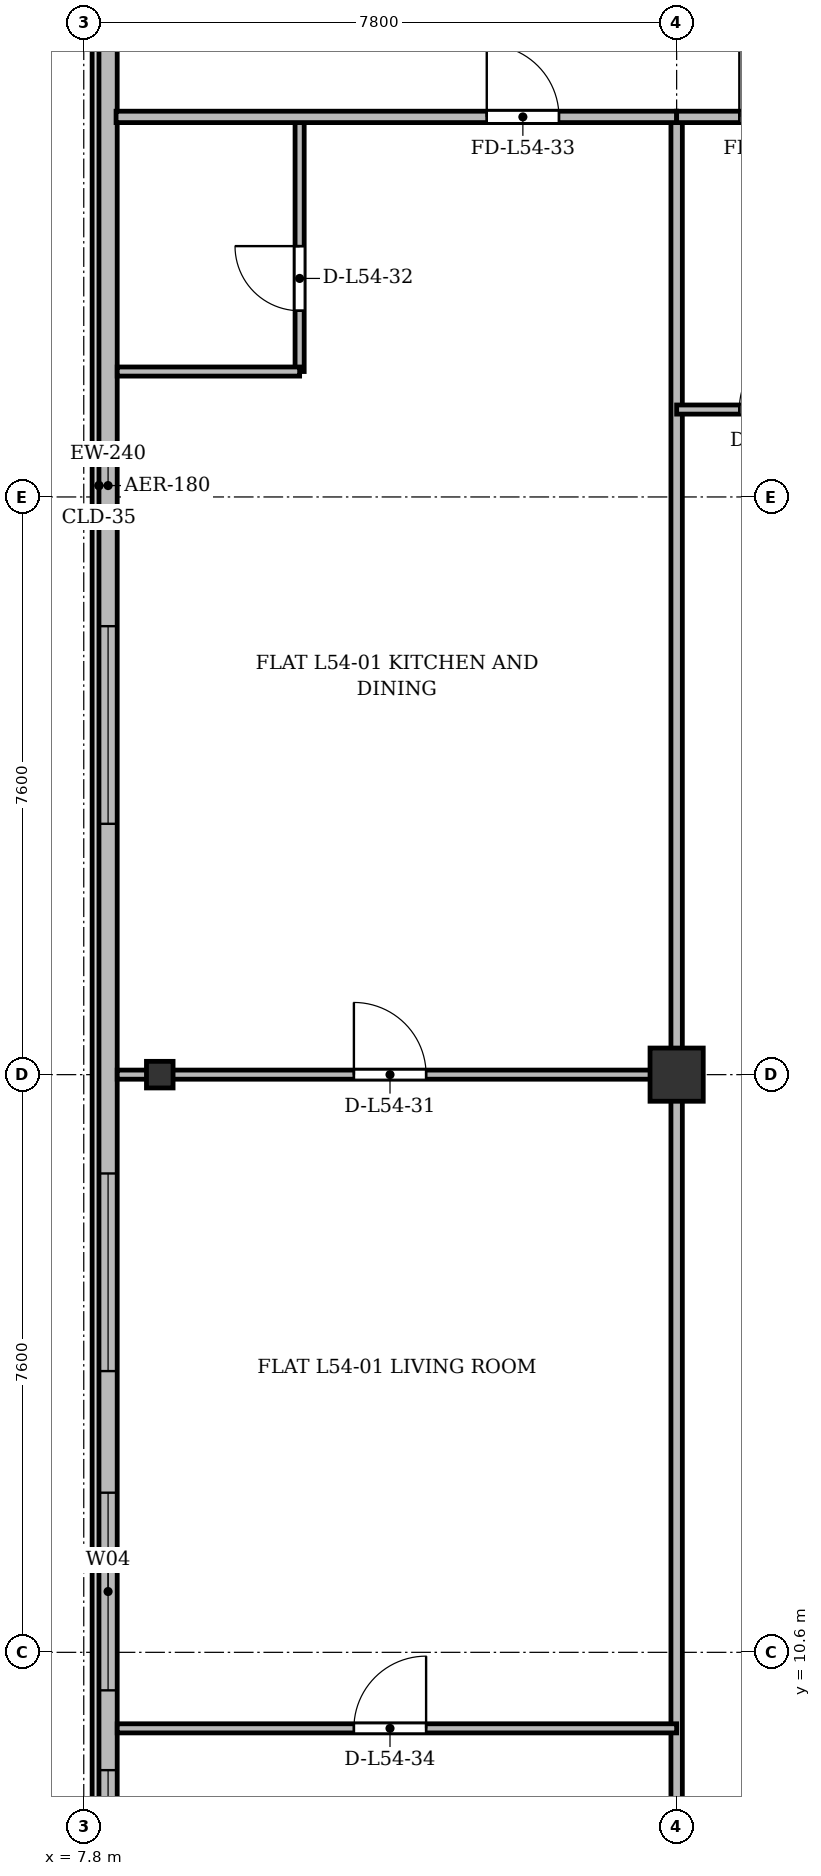
"""IFC4 building model, lengths in metres.
Left out: names, types, materials, properties, quantities, classifications, styles, units other than length and angle.
Written with IfcOpenShell. Run it as: python <this file> out.ifc"""

import sys

from ifc_helpers import new_model, si_unit, direction, frame, frame_2d, origin, origin_2d, place, context, subcontext, project, spatial, rectangle, i_section, extrude, source, transform, mapped, element, fill, save


model = new_model("IFC4")
c1 = context("Model", 3, precision=1e-05, world=origin(), true_north=direction((0.0, 1.0)))
c2 = subcontext(c1, "Body", "Model", "MODEL_VIEW")
j1 = project(units=[si_unit("LENGTHUNIT", "METRE"), si_unit("PLANEANGLEUNIT", "RADIAN")], contexts=[c1])
p1 = place(None, origin())
s1 = spatial("IfcSite", under=j1, at=p1, CompositionType="ELEMENT")
p2 = place(p1, origin())
s2 = spatial("IfcBuilding", under=s1, at=p2, CompositionType="ELEMENT")
p3 = place(p2, frame((0.0, 0.0, 208.5)))
s3 = spatial("IfcBuildingStorey", under=s2, at=p3, CompositionType="ELEMENT", Elevation=208.5)
m1 = source(origin(), c2, "Body", "SweptSolid", [
    extrude(i_section(OverallWidth=0.35, OverallDepth=0.35, WebThickness=0.018, FlangeThickness=0.028, at=origin_2d()), origin(), (0.0, 0.0, 1.0), 3.6),
])
p4 = place(p3, frame((8.8, 18.2, 0.0), z_axis=(0.0, 0.0, 1.0), x_axis=(1.0, 0.0, 0.0)))
e1 = element("IfcColumn", 1, at=p4, inside=s3, PredefinedType="COLUMN", context=c2, shape_type="MappedRepresentation", body=[
    mapped(m1, transform((0.0, 0.0, 0.0), x_axis=(1.0, 0.0, 0.0), y_axis=(0.0, 1.0, 0.0), z_axis=(0.0, 0.0, 1.0), scale=1.0)),
])
m2 = source(origin(), c2, "Body", "SweptSolid", [
    extrude(rectangle(XDim=0.7, YDim=0.7, at=origin_2d()), origin(), (0.0, 0.0, 1.0), 3.6),
])
p5 = place(p3, frame((15.6, 18.2, 0.0), z_axis=(0.0, 0.0, 1.0), x_axis=(1.0, 0.0, 0.0)))
e2 = element("IfcColumn", 2, at=p5, inside=s3, PredefinedType="COLUMN", context=c2, shape_type="MappedRepresentation", body=[
    mapped(m2, transform((0.0, 0.0, 0.0), x_axis=(1.0, 0.0, 0.0), y_axis=(0.0, 1.0, 0.0), z_axis=(0.0, 0.0, 1.0), scale=1.0)),
])
p6 = place(p3, frame((8.12, 6.4, 0.0), z_axis=(0.0, 0.0, 1.0), x_axis=(0.0, 1.0, 0.0)))
e3 = element("IfcWall", 3, at=p6, inside=s3, PredefinedType="SOLIDWALL", context=c2, shape_type="SweptSolid", body=[
    extrude(rectangle(XDim=39.1, YDim=0.24, at=frame_2d((19.55, 0.0))), origin(), (0.0, 0.0, 1.0), 3.36),
])
p7 = place(p6, frame((1.45, 0.0, 0.92)))
e4 = element("IfcOpeningElement", 4, at=p7, cuts=e3, PredefinedType="OPENING", context=c2, shape_type="SweptSolid", body=[
    extrude(rectangle(XDim=1.2, YDim=1.65, at=frame_2d((0.6, 0.825))), frame((0.0, 0.13, 0.0), z_axis=(0.0, -1.0, 0.0), x_axis=(1.0, 0.0, 0.0)), (0.0, 0.0, 1.0), 0.26),
])
p8 = place(p6, frame((3.7, 0.0, 0.92)))
e5 = element("IfcOpeningElement", 5, at=p8, cuts=e3, PredefinedType="OPENING", context=c2, shape_type="SweptSolid", body=[
    extrude(rectangle(XDim=2.6, YDim=1.9, at=frame_2d((1.3, 0.95))), frame((0.0, 0.13, 0.0), z_axis=(0.0, -1.0, 0.0), x_axis=(1.0, 0.0, 0.0)), (0.0, 0.0, 1.0), 0.26),
])
p9 = place(p6, frame((7.9, 0.0, 0.92)))
e6 = element("IfcOpeningElement", 6, at=p9, cuts=e3, PredefinedType="OPENING", context=c2, shape_type="SweptSolid", body=[
    extrude(rectangle(XDim=2.6, YDim=1.9, at=frame_2d((1.3, 0.95))), frame((0.0, 0.13, 0.0), z_axis=(0.0, -1.0, 0.0), x_axis=(1.0, 0.0, 0.0)), (0.0, 0.0, 1.0), 0.26),
])
p10 = place(p6, frame((15.1, 0.0, 0.92)))
e7 = element("IfcOpeningElement", 7, at=p10, cuts=e3, PredefinedType="OPENING", context=c2, shape_type="SweptSolid", body=[
    extrude(rectangle(XDim=2.6, YDim=1.9, at=frame_2d((1.3, 0.95))), frame((0.0, 0.13, 0.0), z_axis=(0.0, -1.0, 0.0), x_axis=(1.0, 0.0, 0.0)), (0.0, 0.0, 1.0), 0.26),
])
p11 = place(p6, frame((33.4, 0.0, 0.92)))
e8 = element("IfcOpeningElement", 8, at=p11, cuts=e3, PredefinedType="OPENING", context=c2, shape_type="SweptSolid", body=[
    extrude(rectangle(XDim=1.2, YDim=1.65, at=frame_2d((0.6, 0.825))), frame((0.0, 0.13, 0.0), z_axis=(0.0, -1.0, 0.0), x_axis=(1.0, 0.0, 0.0)), (0.0, 0.0, 1.0), 0.26),
])
p12 = place(p6, frame((36.75, 0.0, 0.92)))
e9 = element("IfcOpeningElement", 9, at=p12, cuts=e3, PredefinedType="OPENING", context=c2, shape_type="SweptSolid", body=[
    extrude(rectangle(XDim=1.2, YDim=1.65, at=frame_2d((0.6, 0.825))), frame((0.0, 0.13, 0.0), z_axis=(0.0, -1.0, 0.0), x_axis=(1.0, 0.0, 0.0)), (0.0, 0.0, 1.0), 0.26),
])
p13 = place(p3, frame((15.6, 3.625, 0.0), z_axis=(0.0, 0.0, 1.0), x_axis=(0.0, 1.0, 0.0)))
e10 = element("IfcWall", 10, at=p13, inside=s3, PredefinedType="PARTITIONING", context=c2, shape_type="SweptSolid", body=[
    extrude(rectangle(XDim=27.175, YDim=0.15, at=frame_2d((13.587, 0.0))), origin(), (0.0, 0.0, 1.0), 2.86),
])
p14 = place(p3, frame((8.24, 18.2, 0.0), z_axis=(0.0, 0.0, 1.0), x_axis=(1.0, 0.0, 0.0)))
e11 = element("IfcWall", 11, at=p14, inside=s3, PredefinedType="PARTITIONING", context=c2, shape_type="SweptSolid", body=[
    extrude(rectangle(XDim=7.36, YDim=0.12, at=frame_2d((3.68, 0.0))), origin(), (0.0, 0.0, 1.0), 2.91),
])
p15 = place(p14, frame((3.114, 0.0, 0.0)))
e12 = element("IfcOpeningElement", 12, at=p15, cuts=e11, PredefinedType="OPENING", context=c2, shape_type="SweptSolid", body=[
    extrude(rectangle(XDim=0.95, YDim=2.15, at=frame_2d((0.475, 1.075))), frame((0.0, 0.07, 0.0), z_axis=(0.0, -1.0, 0.0), x_axis=(1.0, 0.0, 0.0)), (0.0, 0.0, 1.0), 0.14),
])
p16 = place(p3, frame((10.64, 27.45, 0.0), z_axis=(0.0, 0.0, 1.0), x_axis=(0.0, 1.0, 0.0)))
e13 = element("IfcWall", 13, at=p16, inside=s3, PredefinedType="PARTITIONING", context=c2, shape_type="SweptSolid", body=[
    extrude(rectangle(XDim=3.35, YDim=0.12, at=frame_2d((1.675, 0.0))), origin(), (0.0, 0.0, 1.0), 3.36),
])
p17 = place(p16, frame((0.8, 0.0, 0.0)))
e14 = element("IfcOpeningElement", 14, at=p17, cuts=e13, PredefinedType="OPENING", context=c2, shape_type="SweptSolid", body=[
    extrude(rectangle(XDim=0.85, YDim=2.1, at=frame_2d((0.425, 1.05))), frame((0.0, 0.07, 0.0), z_axis=(0.0, -1.0, 0.0), x_axis=(1.0, 0.0, 0.0)), (0.0, 0.0, 1.0), 0.14),
])
p18 = place(p3, frame((8.24, 27.45, 0.0), z_axis=(0.0, 0.0, 1.0), x_axis=(1.0, 0.0, 0.0)))
e15 = element("IfcWall", 15, at=p18, inside=s3, PredefinedType="PARTITIONING", context=c2, shape_type="SweptSolid", body=[
    extrude(rectangle(XDim=2.4, YDim=0.12, at=frame_2d((1.2, 0.0))), origin(), (0.0, 0.0, 1.0), 2.86),
])
p19 = place(p3, frame((8.225, 30.8, 0.0), z_axis=(0.0, 0.0, 1.0), x_axis=(1.0, 0.0, 0.0)))
e16 = element("IfcWall", 16, at=p19, inside=s3, PredefinedType="PARTITIONING", context=c2, shape_type="SweptSolid", body=[
    extrude(rectangle(XDim=7.375, YDim=0.15, at=frame_2d((3.688, 0.0))), origin(), (0.0, 0.0, 1.0), 2.86),
])
p20 = place(p19, frame((4.877, 0.0, 0.0)))
e17 = element("IfcOpeningElement", 17, at=p20, cuts=e16, PredefinedType="OPENING", context=c2, shape_type="SweptSolid", body=[
    extrude(rectangle(XDim=0.95, YDim=2.15, at=frame_2d((0.475, 1.075))), frame((0.0, 0.085, 0.0), z_axis=(0.0, -1.0, 0.0), x_axis=(1.0, 0.0, 0.0)), (0.0, 0.0, 1.0), 0.17),
])
p21 = place(p3, frame((8.24, 9.6, 0.0), z_axis=(0.0, 0.0, 1.0), x_axis=(1.0, 0.0, 0.0)))
e18 = element("IfcWall", 18, at=p21, inside=s3, PredefinedType="PARTITIONING", context=c2, shape_type="SweptSolid", body=[
    extrude(rectangle(XDim=7.36, YDim=0.12, at=frame_2d((3.68, 0.0))), origin(), (0.0, 0.0, 1.0), 2.86),
])
p22 = place(p21, frame((3.114, 0.0, 0.0)))
e19 = element("IfcOpeningElement", 19, at=p22, cuts=e18, PredefinedType="OPENING", context=c2, shape_type="SweptSolid", body=[
    extrude(rectangle(XDim=0.95, YDim=2.15, at=frame_2d((0.475, 1.075))), frame((0.0, 0.07, 0.0), z_axis=(0.0, -1.0, 0.0), x_axis=(1.0, 0.0, 0.0)), (0.0, 0.0, 1.0), 0.14),
])
p23 = place(p3, frame((15.6, 30.8, 0.0), z_axis=(0.0, 0.0, 1.0), x_axis=(1.0, 0.0, 0.0)))
e20 = element("IfcWall", 20, at=p23, inside=s3, PredefinedType="PARTITIONING", context=c2, shape_type="SweptSolid", body=[
    extrude(rectangle(XDim=2.6, YDim=0.15, at=frame_2d((1.3, 0.0))), origin(), (0.0, 0.0, 1.0), 2.86),
])
p24 = place(p23, frame((0.825, 0.0, 0.0)))
e21 = element("IfcOpeningElement", 21, at=p24, cuts=e20, PredefinedType="OPENING", context=c2, shape_type="SweptSolid", body=[
    extrude(rectangle(XDim=0.95, YDim=2.15, at=frame_2d((0.475, 1.075))), frame((0.0, 0.085, 0.0), z_axis=(0.0, -1.0, 0.0), x_axis=(1.0, 0.0, 0.0)), (0.0, 0.0, 1.0), 0.17),
])
p25 = place(p3, frame((15.6, 26.95, 0.0), z_axis=(0.0, 0.0, 1.0), x_axis=(1.0, 0.0, 0.0)))
e22 = element("IfcWall", 22, at=p25, inside=s3, PredefinedType="PARTITIONING", context=c2, shape_type="SweptSolid", body=[
    extrude(rectangle(XDim=2.6, YDim=0.12, at=frame_2d((1.3, 0.0))), origin(), (0.0, 0.0, 1.0), 2.86),
])
p26 = place(p25, frame((0.825, 0.0, 0.0)))
e23 = element("IfcOpeningElement", 23, at=p26, cuts=e22, PredefinedType="OPENING", context=c2, shape_type="SweptSolid", body=[
    extrude(rectangle(XDim=0.95, YDim=2.15, at=frame_2d((0.475, 1.075))), frame((0.0, 0.07, 0.0), z_axis=(0.0, -1.0, 0.0), x_axis=(1.0, 0.0, 0.0)), (0.0, 0.0, 1.0), 0.14),
])
m3 = source(origin(), c2, "Body", "SweptSolid", [
    extrude(rectangle(XDim=1.2, YDim=1.65, at=frame_2d((0.6, 0.825))), frame((0.0, 0.03, 0.0), z_axis=(0.0, -1.0, 0.0), x_axis=(1.0, 0.0, 0.0)), (0.0, 0.0, 1.0), 0.06),
])
p27 = place(p7, origin())
e24 = element("IfcWindow", 24, at=p27, inside=s3, PartitioningType="SINGLE_PANEL", PredefinedType="WINDOW", context=c2, shape_type="MappedRepresentation", body=[
    mapped(m3, transform((0.0, 0.0, 0.0), x_axis=(1.0, 0.0, 0.0), y_axis=(0.0, 1.0, 0.0), z_axis=(0.0, 0.0, 1.0), scale=1.0)),
])
fill(e4, e24)
m4 = source(origin(), c2, "Body", "SweptSolid", [
    extrude(rectangle(XDim=2.6, YDim=1.9, at=frame_2d((1.3, 0.95))), frame((0.0, 0.03, 0.0), z_axis=(0.0, -1.0, 0.0), x_axis=(1.0, 0.0, 0.0)), (0.0, 0.0, 1.0), 0.06),
])
p28 = place(p8, origin())
e25 = element("IfcWindow", 25, at=p28, inside=s3, PartitioningType="SINGLE_PANEL", PredefinedType="WINDOW", context=c2, shape_type="MappedRepresentation", body=[
    mapped(m4, transform((0.0, 0.0, 0.0), x_axis=(1.0, 0.0, 0.0), y_axis=(0.0, 1.0, 0.0), z_axis=(0.0, 0.0, 1.0), scale=1.0)),
])
fill(e5, e25)
p29 = place(p9, origin())
e26 = element("IfcWindow", 26, at=p29, inside=s3, PartitioningType="SINGLE_PANEL", PredefinedType="WINDOW", context=c2, shape_type="MappedRepresentation", body=[
    mapped(m4, transform((0.0, 0.0, 0.0), x_axis=(1.0, 0.0, 0.0), y_axis=(0.0, 1.0, 0.0), z_axis=(0.0, 0.0, 1.0), scale=1.0)),
])
fill(e6, e26)
p30 = place(p10, origin())
e27 = element("IfcWindow", 27, at=p30, inside=s3, PartitioningType="SINGLE_PANEL", PredefinedType="WINDOW", context=c2, shape_type="MappedRepresentation", body=[
    mapped(m4, transform((0.0, 0.0, 0.0), x_axis=(1.0, 0.0, 0.0), y_axis=(0.0, 1.0, 0.0), z_axis=(0.0, 0.0, 1.0), scale=1.0)),
])
fill(e7, e27)
m5 = source(origin(), c2, "Body", "SweptSolid", [
    extrude(rectangle(XDim=0.95, YDim=2.15, at=frame_2d((0.475, 1.075))), frame((0.0, 0.025, 0.0), z_axis=(0.0, -1.0, 0.0), x_axis=(1.0, 0.0, 0.0)), (0.0, 0.0, 1.0), 0.05),
])
p31 = place(p15, origin())
e28 = element("IfcDoor", 28, at=p31, inside=s3, OperationType="SINGLE_SWING_LEFT", PredefinedType="DOOR", context=c2, shape_type="MappedRepresentation", body=[
    mapped(m5, transform((0.0, 0.0, 0.0), x_axis=(1.0, 0.0, 0.0), y_axis=(0.0, 1.0, 0.0), z_axis=(0.0, 0.0, 1.0), scale=1.0)),
])
fill(e12, e28)
m6 = source(origin(), c2, "Body", "SweptSolid", [
    extrude(rectangle(XDim=0.85, YDim=2.1, at=frame_2d((0.425, 1.05))), frame((0.0, 0.025, 0.0), z_axis=(0.0, -1.0, 0.0), x_axis=(1.0, 0.0, 0.0)), (0.0, 0.0, 1.0), 0.05),
])
p32 = place(p17, origin())
e29 = element("IfcDoor", 29, at=p32, inside=s3, OperationType="SINGLE_SWING_RIGHT", PredefinedType="DOOR", context=c2, shape_type="MappedRepresentation", body=[
    mapped(m6, transform((0.0, 0.0, 0.0), x_axis=(1.0, 0.0, 0.0), y_axis=(0.0, 1.0, 0.0), z_axis=(0.0, 0.0, 1.0), scale=1.0)),
])
fill(e14, e29)
p33 = place(p20, origin())
e30 = element("IfcDoor", 30, at=p33, inside=s3, OperationType="SINGLE_SWING_LEFT", PredefinedType="DOOR", context=c2, shape_type="MappedRepresentation", body=[
    mapped(m5, transform((0.0, 0.0, 0.0), x_axis=(1.0, 0.0, 0.0), y_axis=(0.0, 1.0, 0.0), z_axis=(0.0, 0.0, 1.0), scale=1.0)),
])
fill(e17, e30)
p34 = place(p22, origin())
e31 = element("IfcDoor", 31, at=p34, inside=s3, OperationType="SINGLE_SWING_RIGHT", PredefinedType="DOOR", context=c2, shape_type="MappedRepresentation", body=[
    mapped(m5, transform((0.0, 0.0, 0.0), x_axis=(1.0, 0.0, 0.0), y_axis=(0.0, 1.0, 0.0), z_axis=(0.0, 0.0, 1.0), scale=1.0)),
])
fill(e19, e31)
p35 = place(p24, origin())
e32 = element("IfcDoor", 32, at=p35, inside=s3, OperationType="SINGLE_SWING_LEFT", PredefinedType="DOOR", context=c2, shape_type="MappedRepresentation", body=[
    mapped(m5, transform((0.0, 0.0, 0.0), x_axis=(1.0, 0.0, 0.0), y_axis=(0.0, 1.0, 0.0), z_axis=(0.0, 0.0, 1.0), scale=1.0)),
])
fill(e21, e32)
p36 = place(p26, origin())
e33 = element("IfcDoor", 33, at=p36, inside=s3, OperationType="SINGLE_SWING_RIGHT", PredefinedType="DOOR", context=c2, shape_type="MappedRepresentation", body=[
    mapped(m5, transform((0.0, 0.0, 0.0), x_axis=(1.0, 0.0, 0.0), y_axis=(0.0, 1.0, 0.0), z_axis=(0.0, 0.0, 1.0), scale=1.0)),
])
fill(e23, e33)
save(model, sys.argv[1])
